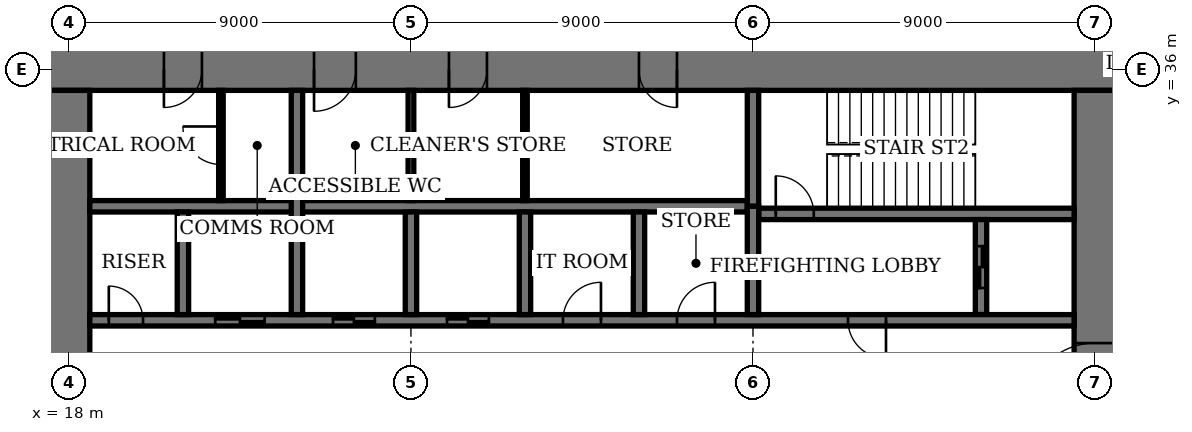
"""IFC4 building model, lengths in metres.
Left out: names, types, materials, properties, quantities, classifications, styles, units other than length and angle.
Written with IfcOpenShell. Run it as: python <this file> out.ifc"""

import sys

from ifc_helpers import new_model, si_unit, direction, frame, frame_2d, origin, place, context, subcontext, project, spatial, rectangle, extrude, element, fill, save


model = new_model("IFC4")
c1 = context("Model", 3, precision=1e-05, world=origin(), true_north=direction((0.0, 1.0)))
c2 = subcontext(c1, "Body", "Model", "MODEL_VIEW")
j1 = project(units=[si_unit("LENGTHUNIT", "METRE"), si_unit("PLANEANGLEUNIT", "RADIAN")], contexts=[c1])
p1 = place(None, origin())
s1 = spatial("IfcSite", under=j1, at=p1, CompositionType="ELEMENT")
p2 = place(p1, origin())
s2 = spatial("IfcBuilding", under=s1, at=p2, CompositionType="ELEMENT")
p3 = place(p2, frame((0.0, 0.0, 214.2)))
s3 = spatial("IfcBuildingStorey", under=s2, at=p3, CompositionType="ELEMENT", Elevation=214.2)
p4 = place(p3, frame((45.55, 36.0, 0.0), z_axis=(0.0, 0.0, 1.0), x_axis=(-1.0, 0.0, 0.0)))
e1 = element("IfcWall", 1, at=p4, inside=s3, PredefinedType="SHEAR", context=c2, shape_type="SweptSolid", body=[
    extrude(rectangle(XDim=28.1, YDim=1.1, at=frame_2d((14.05, 0.0))), origin(), (0.0, 0.0, 1.0), 4.0),
])
p5 = place(p4, frame((11.55, 0.0, 0.0)))
e2 = element("IfcOpeningElement", 2, at=p5, cuts=e1, PredefinedType="OPENING", context=c2, shape_type="SweptSolid", body=[
    extrude(rectangle(XDim=1.0, YDim=2.4, at=frame_2d((0.5, 1.2))), frame((0.0, 0.56, 0.0), z_axis=(0.0, -1.0, 0.0), x_axis=(1.0, 0.0, 0.0)), (0.0, 0.0, 1.0), 1.12),
])
p6 = place(p4, frame((16.55, 0.0, 0.0)))
e3 = element("IfcOpeningElement", 3, at=p6, cuts=e1, PredefinedType="OPENING", context=c2, shape_type="SweptSolid", body=[
    extrude(rectangle(XDim=1.0, YDim=2.4, at=frame_2d((0.5, 1.2))), frame((0.0, 0.56, 0.0), z_axis=(0.0, -1.0, 0.0), x_axis=(1.0, 0.0, 0.0)), (0.0, 0.0, 1.0), 1.12),
])
p7 = place(p4, frame((20.0, 0.0, 0.0)))
e4 = element("IfcOpeningElement", 4, at=p7, cuts=e1, PredefinedType="OPENING", context=c2, shape_type="SweptSolid", body=[
    extrude(rectangle(XDim=1.1, YDim=2.4, at=frame_2d((0.55, 1.2))), frame((0.0, 0.56, 0.0), z_axis=(0.0, -1.0, 0.0), x_axis=(1.0, 0.0, 0.0)), (0.0, 0.0, 1.0), 1.12),
])
p8 = place(p4, frame((24.05, 0.0, 0.0)))
e5 = element("IfcOpeningElement", 5, at=p8, cuts=e1, PredefinedType="OPENING", context=c2, shape_type="SweptSolid", body=[
    extrude(rectangle(XDim=1.0, YDim=2.4, at=frame_2d((0.5, 1.2))), frame((0.0, 0.56, 0.0), z_axis=(0.0, -1.0, 0.0), x_axis=(1.0, 0.0, 0.0)), (0.0, 0.0, 1.0), 1.12),
])
p9 = place(p3, frame((18.0, 35.45, 0.0), z_axis=(0.0, 0.0, 1.0), x_axis=(0.0, -1.0, 0.0)))
e6 = element("IfcWall", 6, at=p9, inside=s3, PredefinedType="SHEAR", context=c2, shape_type="SweptSolid", body=[
    extrude(rectangle(XDim=16.9, YDim=1.1, at=frame_2d((8.45, 0.0))), origin(), (0.0, 0.0, 1.0), 4.0),
])
p10 = place(p9, frame((8.45, 0.0, 0.0)))
e7 = element("IfcOpeningElement", 7, at=p10, cuts=e6, PredefinedType="OPENING", context=c2, shape_type="SweptSolid", body=[
    extrude(rectangle(XDim=1.8, YDim=2.4, at=frame_2d((0.9, 1.2))), frame((0.0, 0.56, 0.0), z_axis=(0.0, -1.0, 0.0), x_axis=(1.0, 0.0, 0.0)), (0.0, 0.0, 1.0), 1.12),
])
p11 = place(p3, frame((45.0, 18.55, 0.0), z_axis=(0.0, 0.0, 1.0), x_axis=(0.0, 1.0, 0.0)))
e8 = element("IfcWall", 8, at=p11, inside=s3, PredefinedType="SHEAR", context=c2, shape_type="SweptSolid", body=[
    extrude(rectangle(XDim=16.9, YDim=1.1, at=frame_2d((8.45, 0.0))), origin(), (0.0, 0.0, 1.0), 4.0),
])
p12 = place(p11, frame((8.45, 0.0, 0.0)))
e9 = element("IfcOpeningElement", 9, at=p12, cuts=e8, PredefinedType="OPENING", context=c2, shape_type="SweptSolid", body=[
    extrude(rectangle(XDim=1.8, YDim=2.4, at=frame_2d((0.9, 1.2))), frame((0.0, 0.56, 0.0), z_axis=(0.0, -1.0, 0.0), x_axis=(1.0, 0.0, 0.0)), (0.0, 0.0, 1.0), 1.12),
])
p13 = place(p3, frame((36.15, 32.2, 0.0), z_axis=(0.0, 0.0, 1.0), x_axis=(1.0, 0.0, 0.0)))
e10 = element("IfcWall", 10, at=p13, inside=s3, PredefinedType="SHEAR", context=c2, shape_type="SweptSolid", body=[
    extrude(rectangle(XDim=8.3, YDim=0.3, at=frame_2d((4.15, 0.0))), origin(), (0.0, 0.0, 1.0), 4.0),
])
p14 = place(p13, frame((0.45, 0.0, 0.0)))
e11 = element("IfcOpeningElement", 11, at=p14, cuts=e10, PredefinedType="OPENING", context=c2, shape_type="SweptSolid", body=[
    extrude(rectangle(XDim=1.0, YDim=2.4, at=frame_2d((0.5, 1.2))), frame((0.0, 0.16, 0.0), z_axis=(0.0, -1.0, 0.0), x_axis=(1.0, 0.0, 0.0)), (0.0, 0.0, 1.0), 0.32),
])
p15 = place(p3, frame((36.0, 32.4, 0.0), z_axis=(0.0, 0.0, 1.0), x_axis=(0.0, 1.0, 0.0)))
e12 = element("IfcWall", 12, at=p15, inside=s3, PredefinedType="SHEAR", context=c2, shape_type="SweptSolid", body=[
    extrude(rectangle(XDim=3.05, YDim=0.3, at=frame_2d((1.525, 0.0))), origin(), (0.0, 0.0, 1.0), 4.0),
])
p16 = place(p3, frame((42.0, 29.55, 0.0), z_axis=(0.0, 0.0, 1.0), x_axis=(0.0, 1.0, 0.0)))
e13 = element("IfcWall", 13, at=p16, inside=s3, PredefinedType="SHEAR", context=c2, shape_type="SweptSolid", body=[
    extrude(rectangle(XDim=2.5, YDim=0.3, at=frame_2d((1.25, 0.0))), origin(), (0.0, 0.0, 1.0), 4.0),
])
p17 = place(p16, frame((0.7, 0.0, 0.0)))
e14 = element("IfcOpeningElement", 14, at=p17, cuts=e13, PredefinedType="OPENING", context=c2, shape_type="SweptSolid", body=[
    extrude(rectangle(XDim=1.1, YDim=2.4, at=frame_2d((0.55, 1.2))), frame((0.0, 0.16, 0.0), z_axis=(0.0, -1.0, 0.0), x_axis=(1.0, 0.0, 0.0)), (0.0, 0.0, 1.0), 0.32),
])
p18 = place(p3, frame((18.55, 29.4, 0.0), z_axis=(0.0, 0.0, 1.0), x_axis=(1.0, 0.0, 0.0)))
e15 = element("IfcWall", 15, at=p18, inside=s3, PredefinedType="SHEAR", context=c2, shape_type="SweptSolid", body=[
    extrude(rectangle(XDim=25.9, YDim=0.3, at=frame_2d((12.95, 0.0))), origin(), (0.0, 0.0, 1.0), 4.0),
])
p19 = place(p18, frame((19.95, 0.0, 0.0)))
e16 = element("IfcOpeningElement", 16, at=p19, cuts=e15, PredefinedType="OPENING", context=c2, shape_type="SweptSolid", body=[
    extrude(rectangle(XDim=1.0, YDim=2.4, at=frame_2d((0.5, 1.2))), frame((0.0, 0.16, 0.0), z_axis=(0.0, -1.0, 0.0), x_axis=(1.0, 0.0, 0.0)), (0.0, 0.0, 1.0), 0.32),
])
p20 = place(p18, frame((0.5, 0.0, 0.0)))
e17 = element("IfcOpeningElement", 17, at=p20, cuts=e15, PredefinedType="OPENING", context=c2, shape_type="SweptSolid", body=[
    extrude(rectangle(XDim=0.9, YDim=2.1, at=frame_2d((0.45, 1.05))), frame((0.0, 0.16, 0.0), z_axis=(0.0, -1.0, 0.0), x_axis=(1.0, 0.0, 0.0)), (0.0, 0.0, 1.0), 0.32),
])
p21 = place(p18, frame((15.45, 0.0, 0.0)))
e18 = element("IfcOpeningElement", 18, at=p21, cuts=e15, PredefinedType="OPENING", context=c2, shape_type="SweptSolid", body=[
    extrude(rectangle(XDim=1.0, YDim=2.4, at=frame_2d((0.5, 1.2))), frame((0.0, 0.16, 0.0), z_axis=(0.0, -1.0, 0.0), x_axis=(1.0, 0.0, 0.0)), (0.0, 0.0, 1.0), 0.32),
])
p22 = place(p18, frame((12.45, 0.0, 0.0)))
e19 = element("IfcOpeningElement", 19, at=p22, cuts=e15, PredefinedType="OPENING", context=c2, shape_type="SweptSolid", body=[
    extrude(rectangle(XDim=1.0, YDim=2.4, at=frame_2d((0.5, 1.2))), frame((0.0, 0.16, 0.0), z_axis=(0.0, -1.0, 0.0), x_axis=(1.0, 0.0, 0.0)), (0.0, 0.0, 1.0), 0.32),
])
p23 = place(p18, frame((9.4, 0.0, 0.0)))
e20 = element("IfcOpeningElement", 20, at=p23, cuts=e15, PredefinedType="OPENING", context=c2, shape_type="SweptSolid", body=[
    extrude(rectangle(XDim=1.1, YDim=2.4, at=frame_2d((0.55, 1.2))), frame((0.0, 0.16, 0.0), z_axis=(0.0, -1.0, 0.0), x_axis=(1.0, 0.0, 0.0)), (0.0, 0.0, 1.0), 0.32),
])
p24 = place(p18, frame((6.4, 0.0, 0.0)))
e21 = element("IfcOpeningElement", 21, at=p24, cuts=e15, PredefinedType="OPENING", context=c2, shape_type="SweptSolid", body=[
    extrude(rectangle(XDim=1.1, YDim=2.4, at=frame_2d((0.55, 1.2))), frame((0.0, 0.16, 0.0), z_axis=(0.0, -1.0, 0.0), x_axis=(1.0, 0.0, 0.0)), (0.0, 0.0, 1.0), 0.32),
])
p25 = place(p18, frame((3.3, 0.0, 0.0)))
e22 = element("IfcOpeningElement", 22, at=p25, cuts=e15, PredefinedType="OPENING", context=c2, shape_type="SweptSolid", body=[
    extrude(rectangle(XDim=1.3, YDim=2.4, at=frame_2d((0.65, 1.2))), frame((0.0, 0.16, 0.0), z_axis=(0.0, -1.0, 0.0), x_axis=(1.0, 0.0, 0.0)), (0.0, 0.0, 1.0), 0.32),
])
p26 = place(p3, frame((18.55, 32.4, 0.0), z_axis=(0.0, 0.0, 1.0), x_axis=(1.0, 0.0, 0.0)))
e23 = element("IfcWall", 23, at=p26, inside=s3, PredefinedType="SHEAR", context=c2, shape_type="SweptSolid", body=[
    extrude(rectangle(XDim=17.3, YDim=0.3, at=frame_2d((8.65, 0.0))), origin(), (0.0, 0.0, 1.0), 4.0),
])
for number, where, z_axis, x_axis in (
    (24, (33.0, 29.55, 0.0), (0.0, 0.0, 1.0), (0.0, 1.0, 0.0)),
    (25, (30.0, 29.55, 0.0), (0.0, 0.0, 1.0), (0.0, 1.0, 0.0)),
    (26, (27.0, 29.55, 0.0), (0.0, 0.0, 1.0), (0.0, 1.0, 0.0)),
):
    element("IfcWall", number, at=place(p3, frame(where, z_axis=z_axis, x_axis=x_axis)), inside=s3, PredefinedType="SHEAR", context=c2, shape_type="SweptSolid", body=[
        extrude(rectangle(XDim=2.7, YDim=0.3, at=frame_2d((1.35, 0.0))), origin(), (0.0, 0.0, 1.0), 4.0),
    ])
p27 = place(p3, frame((24.0, 29.55, 0.0), z_axis=(0.0, 0.0, 1.0), x_axis=(0.0, 1.0, 0.0)))
e27 = element("IfcWall", 27, at=p27, inside=s3, PredefinedType="SHEAR", context=c2, shape_type="SweptSolid", body=[
    extrude(rectangle(XDim=5.9, YDim=0.3, at=frame_2d((2.95, 0.0))), origin(), (0.0, 0.0, 1.0), 4.0),
])
p28 = place(p3, frame((21.0, 29.55, 0.0), z_axis=(0.0, 0.0, 1.0), x_axis=(0.0, 1.0, 0.0)))
e28 = element("IfcWall", 28, at=p28, inside=s3, PredefinedType="SHEAR", context=c2, shape_type="SweptSolid", body=[
    extrude(rectangle(XDim=2.7, YDim=0.3, at=frame_2d((1.35, 0.0))), origin(), (0.0, 0.0, 1.0), 4.0),
])
p29 = place(p3, frame((36.0, 29.55, 0.0), z_axis=(0.0, 0.0, 1.0), x_axis=(0.0, 1.0, 0.0)))
e29 = element("IfcWall", 29, at=p29, inside=s3, PredefinedType="SHEAR", context=c2, shape_type="SweptSolid", body=[
    extrude(rectangle(XDim=2.85, YDim=0.3, at=frame_2d((1.425, 0.0))), origin(), (0.0, 0.0, 1.0), 4.0),
])
p30 = place(p3, frame((30.0, 32.55, 0.0), z_axis=(0.0, 0.0, 1.0), x_axis=(0.0, 1.0, 0.0)))
e30 = element("IfcWall", 30, at=p30, inside=s3, PredefinedType="PARTITIONING", context=c2, shape_type="SweptSolid", body=[
    extrude(rectangle(XDim=2.9, YDim=0.12, at=frame_2d((1.45, 0.0))), origin(), (0.0, 0.0, 1.0), 3.75),
])
p31 = place(p3, frame((27.0, 32.55, 0.0), z_axis=(0.0, 0.0, 1.0), x_axis=(0.0, 1.0, 0.0)))
e31 = element("IfcWall", 31, at=p31, inside=s3, PredefinedType="PARTITIONING", context=c2, shape_type="SweptSolid", body=[
    extrude(rectangle(XDim=2.9, YDim=0.15, at=frame_2d((1.45, 0.0))), origin(), (0.0, 0.0, 1.0), 3.75),
])
p32 = place(p3, frame((22.0, 32.55, 0.0), z_axis=(0.0, 0.0, 1.0), x_axis=(0.0, 1.0, 0.0)))
e32 = element("IfcWall", 32, at=p32, inside=s3, PredefinedType="PARTITIONING", context=c2, shape_type="SweptSolid", body=[
    extrude(rectangle(XDim=2.9, YDim=0.12, at=frame_2d((1.45, 0.0))), origin(), (0.0, 0.0, 1.0), 3.75),
])
p33 = place(p32, frame((0.95, 0.0, 0.0)))
e33 = element("IfcOpeningElement", 33, at=p33, cuts=e32, PredefinedType="OPENING", context=c2, shape_type="SweptSolid", body=[
    extrude(rectangle(XDim=1.0, YDim=2.4, at=frame_2d((0.5, 1.2))), frame((0.0, 0.07, 0.0), z_axis=(0.0, -1.0, 0.0), x_axis=(1.0, 0.0, 0.0)), (0.0, 0.0, 1.0), 0.14),
])
p34 = place(p12, origin())
e34 = element("IfcDoor", 34, at=p34, inside=s3, OperationType="DOUBLE_DOOR_DOUBLE_SWING", PredefinedType="DOOR", context=c2, shape_type="SweptSolid", body=[
    extrude(rectangle(XDim=1.8, YDim=2.4, at=frame_2d((0.9, 1.2))), frame((0.0, 0.03, 0.0), z_axis=(0.0, -1.0, 0.0), x_axis=(1.0, 0.0, 0.0)), (0.0, 0.0, 1.0), 0.06),
    extrude(rectangle(XDim=0.04, YDim=2.4, at=frame_2d((0.02, 1.2))), frame((0.0, 0.55, 0.0), z_axis=(0.0, -1.0, 0.0), x_axis=(1.0, 0.0, 0.0)), (0.0, 0.0, 1.0), 1.1),
    extrude(rectangle(XDim=0.04, YDim=2.4, at=frame_2d((1.78, 1.2))), frame((0.0, 0.55, 0.0), z_axis=(0.0, -1.0, 0.0), x_axis=(1.0, 0.0, 0.0)), (0.0, 0.0, 1.0), 1.1),
    extrude(rectangle(XDim=1.8, YDim=0.04, at=frame_2d((0.9, 2.38))), frame((0.0, 0.55, 0.0), z_axis=(0.0, -1.0, 0.0), x_axis=(1.0, 0.0, 0.0)), (0.0, 0.0, 1.0), 1.1),
])
fill(e9, e34)
p35 = place(p5, origin())
e35 = element("IfcDoor", 35, at=p35, inside=s3, OperationType="SINGLE_SWING_RIGHT", PredefinedType="DOOR", context=c2, shape_type="SweptSolid", body=[
    extrude(rectangle(XDim=1.0, YDim=2.4, at=frame_2d((0.5, 1.2))), frame((0.0, 0.025, 0.0), z_axis=(0.0, -1.0, 0.0), x_axis=(1.0, 0.0, 0.0)), (0.0, 0.0, 1.0), 0.05),
    extrude(rectangle(XDim=0.04, YDim=2.4, at=frame_2d((0.02, 1.2))), frame((0.0, 0.4, 0.0), z_axis=(0.0, -1.0, 0.0), x_axis=(1.0, 0.0, 0.0)), (0.0, 0.0, 1.0), 0.8),
    extrude(rectangle(XDim=0.04, YDim=2.4, at=frame_2d((0.98, 1.2))), frame((0.0, 0.4, 0.0), z_axis=(0.0, -1.0, 0.0), x_axis=(1.0, 0.0, 0.0)), (0.0, 0.0, 1.0), 0.8),
    extrude(rectangle(XDim=1.0, YDim=0.04, at=frame_2d((0.5, 2.38))), frame((0.0, 0.4, 0.0), z_axis=(0.0, -1.0, 0.0), x_axis=(1.0, 0.0, 0.0)), (0.0, 0.0, 1.0), 0.8),
])
fill(e2, e35)
p36 = place(p6, origin())
e36 = element("IfcDoor", 36, at=p36, inside=s3, OperationType="SINGLE_SWING_LEFT", PredefinedType="DOOR", context=c2, shape_type="SweptSolid", body=[
    extrude(rectangle(XDim=1.0, YDim=2.4, at=frame_2d((0.5, 1.2))), frame((0.0, 0.025, 0.0), z_axis=(0.0, -1.0, 0.0), x_axis=(1.0, 0.0, 0.0)), (0.0, 0.0, 1.0), 0.05),
    extrude(rectangle(XDim=0.04, YDim=2.4, at=frame_2d((0.02, 1.2))), frame((0.0, 0.4, 0.0), z_axis=(0.0, -1.0, 0.0), x_axis=(1.0, 0.0, 0.0)), (0.0, 0.0, 1.0), 0.8),
    extrude(rectangle(XDim=0.04, YDim=2.4, at=frame_2d((0.98, 1.2))), frame((0.0, 0.4, 0.0), z_axis=(0.0, -1.0, 0.0), x_axis=(1.0, 0.0, 0.0)), (0.0, 0.0, 1.0), 0.8),
    extrude(rectangle(XDim=1.0, YDim=0.04, at=frame_2d((0.5, 2.38))), frame((0.0, 0.4, 0.0), z_axis=(0.0, -1.0, 0.0), x_axis=(1.0, 0.0, 0.0)), (0.0, 0.0, 1.0), 0.8),
])
fill(e3, e36)
p37 = place(p7, origin())
e37 = element("IfcDoor", 37, at=p37, inside=s3, OperationType="SINGLE_SWING_LEFT", PredefinedType="DOOR", context=c2, shape_type="SweptSolid", body=[
    extrude(rectangle(XDim=1.1, YDim=2.4, at=frame_2d((0.55, 1.2))), frame((0.0, 0.025, 0.0), z_axis=(0.0, -1.0, 0.0), x_axis=(1.0, 0.0, 0.0)), (0.0, 0.0, 1.0), 0.05),
    extrude(rectangle(XDim=0.04, YDim=2.4, at=frame_2d((0.02, 1.2))), frame((0.0, 0.44, 0.0), z_axis=(0.0, -1.0, 0.0), x_axis=(1.0, 0.0, 0.0)), (0.0, 0.0, 1.0), 0.88),
    extrude(rectangle(XDim=0.04, YDim=2.4, at=frame_2d((1.08, 1.2))), frame((0.0, 0.44, 0.0), z_axis=(0.0, -1.0, 0.0), x_axis=(1.0, 0.0, 0.0)), (0.0, 0.0, 1.0), 0.88),
    extrude(rectangle(XDim=1.1, YDim=0.04, at=frame_2d((0.55, 2.38))), frame((0.0, 0.44, 0.0), z_axis=(0.0, -1.0, 0.0), x_axis=(1.0, 0.0, 0.0)), (0.0, 0.0, 1.0), 0.88),
])
fill(e4, e37)
p38 = place(p8, origin())
e38 = element("IfcDoor", 38, at=p38, inside=s3, OperationType="SINGLE_SWING_LEFT", PredefinedType="DOOR", context=c2, shape_type="SweptSolid", body=[
    extrude(rectangle(XDim=1.0, YDim=2.4, at=frame_2d((0.5, 1.2))), frame((0.0, 0.025, 0.0), z_axis=(0.0, -1.0, 0.0), x_axis=(1.0, 0.0, 0.0)), (0.0, 0.0, 1.0), 0.05),
    extrude(rectangle(XDim=0.04, YDim=2.4, at=frame_2d((0.02, 1.2))), frame((0.0, 0.4, 0.0), z_axis=(0.0, -1.0, 0.0), x_axis=(1.0, 0.0, 0.0)), (0.0, 0.0, 1.0), 0.8),
    extrude(rectangle(XDim=0.04, YDim=2.4, at=frame_2d((0.98, 1.2))), frame((0.0, 0.4, 0.0), z_axis=(0.0, -1.0, 0.0), x_axis=(1.0, 0.0, 0.0)), (0.0, 0.0, 1.0), 0.8),
    extrude(rectangle(XDim=1.0, YDim=0.04, at=frame_2d((0.5, 2.38))), frame((0.0, 0.4, 0.0), z_axis=(0.0, -1.0, 0.0), x_axis=(1.0, 0.0, 0.0)), (0.0, 0.0, 1.0), 0.8),
])
fill(e5, e38)
p39 = place(p14, origin())
e39 = element("IfcDoor", 39, at=p39, inside=s3, OperationType="SINGLE_SWING_RIGHT", PredefinedType="DOOR", context=c2, shape_type="SweptSolid", body=[
    extrude(rectangle(XDim=1.0, YDim=2.4, at=frame_2d((0.5, 1.2))), frame((0.0, 0.03, 0.0), z_axis=(0.0, -1.0, 0.0), x_axis=(1.0, 0.0, 0.0)), (0.0, 0.0, 1.0), 0.06),
])
fill(e11, e39)
p40 = place(p19, origin())
e40 = element("IfcDoor", 40, at=p40, inside=s3, OperationType="SINGLE_SWING_RIGHT", PredefinedType="DOOR", context=c2, shape_type="SweptSolid", body=[
    extrude(rectangle(XDim=1.0, YDim=2.4, at=frame_2d((0.5, 1.2))), frame((0.0, 0.03, 0.0), z_axis=(0.0, -1.0, 0.0), x_axis=(1.0, 0.0, 0.0)), (0.0, 0.0, 1.0), 0.06),
])
fill(e16, e40)
p41 = place(p20, origin())
e41 = element("IfcDoor", 41, at=p41, inside=s3, OperationType="SINGLE_SWING_RIGHT", PredefinedType="DOOR", context=c2, shape_type="SweptSolid", body=[
    extrude(rectangle(XDim=0.9, YDim=2.1, at=frame_2d((0.45, 1.05))), frame((0.0, 0.03, 0.0), z_axis=(0.0, -1.0, 0.0), x_axis=(1.0, 0.0, 0.0)), (0.0, 0.0, 1.0), 0.06),
])
fill(e17, e41)
p42 = place(p33, origin())
e42 = element("IfcDoor", 42, at=p42, inside=s3, OperationType="SINGLE_SWING_LEFT", PredefinedType="DOOR", context=c2, shape_type="SweptSolid", body=[
    extrude(rectangle(XDim=1.0, YDim=2.4, at=frame_2d((0.5, 1.2))), frame((0.0, 0.03, 0.0), z_axis=(0.0, -1.0, 0.0), x_axis=(1.0, 0.0, 0.0)), (0.0, 0.0, 1.0), 0.06),
])
fill(e33, e42)
p43 = place(p21, origin())
e43 = element("IfcDoor", 43, at=p43, inside=s3, OperationType="SINGLE_SWING_LEFT", PredefinedType="DOOR", context=c2, shape_type="SweptSolid", body=[
    extrude(rectangle(XDim=1.0, YDim=2.4, at=frame_2d((0.5, 1.2))), frame((0.0, 0.03, 0.0), z_axis=(0.0, -1.0, 0.0), x_axis=(1.0, 0.0, 0.0)), (0.0, 0.0, 1.0), 0.06),
])
fill(e18, e43)
p44 = place(p22, origin())
e44 = element("IfcDoor", 44, at=p44, inside=s3, OperationType="SINGLE_SWING_LEFT", PredefinedType="DOOR", context=c2, shape_type="SweptSolid", body=[
    extrude(rectangle(XDim=1.0, YDim=2.4, at=frame_2d((0.5, 1.2))), frame((0.0, 0.03, 0.0), z_axis=(0.0, -1.0, 0.0), x_axis=(1.0, 0.0, 0.0)), (0.0, 0.0, 1.0), 0.06),
])
fill(e19, e44)
p45 = place(p23, origin())
e45 = element("IfcDoor", 45, at=p45, inside=s3, OperationType="DOUBLE_DOOR_SLIDING", PredefinedType="DOOR", context=c2, shape_type="SweptSolid", body=[
    extrude(rectangle(XDim=1.1, YDim=2.4, at=frame_2d((0.55, 1.2))), frame((0.0, 0.02, 0.0), z_axis=(0.0, -1.0, 0.0), x_axis=(1.0, 0.0, 0.0)), (0.0, 0.0, 1.0), 0.04),
])
fill(e20, e45)
p46 = place(p24, origin())
e46 = element("IfcDoor", 46, at=p46, inside=s3, OperationType="DOUBLE_DOOR_SLIDING", PredefinedType="DOOR", context=c2, shape_type="SweptSolid", body=[
    extrude(rectangle(XDim=1.1, YDim=2.4, at=frame_2d((0.55, 1.2))), frame((0.0, 0.02, 0.0), z_axis=(0.0, -1.0, 0.0), x_axis=(1.0, 0.0, 0.0)), (0.0, 0.0, 1.0), 0.04),
])
fill(e21, e46)
p47 = place(p25, origin())
e47 = element("IfcDoor", 47, at=p47, inside=s3, OperationType="DOUBLE_DOOR_SLIDING", PredefinedType="DOOR", context=c2, shape_type="SweptSolid", body=[
    extrude(rectangle(XDim=1.3, YDim=2.4, at=frame_2d((0.65, 1.2))), frame((0.0, 0.02, 0.0), z_axis=(0.0, -1.0, 0.0), x_axis=(1.0, 0.0, 0.0)), (0.0, 0.0, 1.0), 0.04),
])
fill(e22, e47)
p48 = place(p17, origin())
e48 = element("IfcDoor", 48, at=p48, inside=s3, OperationType="DOUBLE_DOOR_SLIDING", PredefinedType="DOOR", context=c2, shape_type="SweptSolid", body=[
    extrude(rectangle(XDim=1.1, YDim=2.4, at=frame_2d((0.55, 1.2))), frame((0.0, 0.03, 0.0), z_axis=(0.0, -1.0, 0.0), x_axis=(1.0, 0.0, 0.0)), (0.0, 0.0, 1.0), 0.06),
])
fill(e14, e48)
save(model, sys.argv[1])
